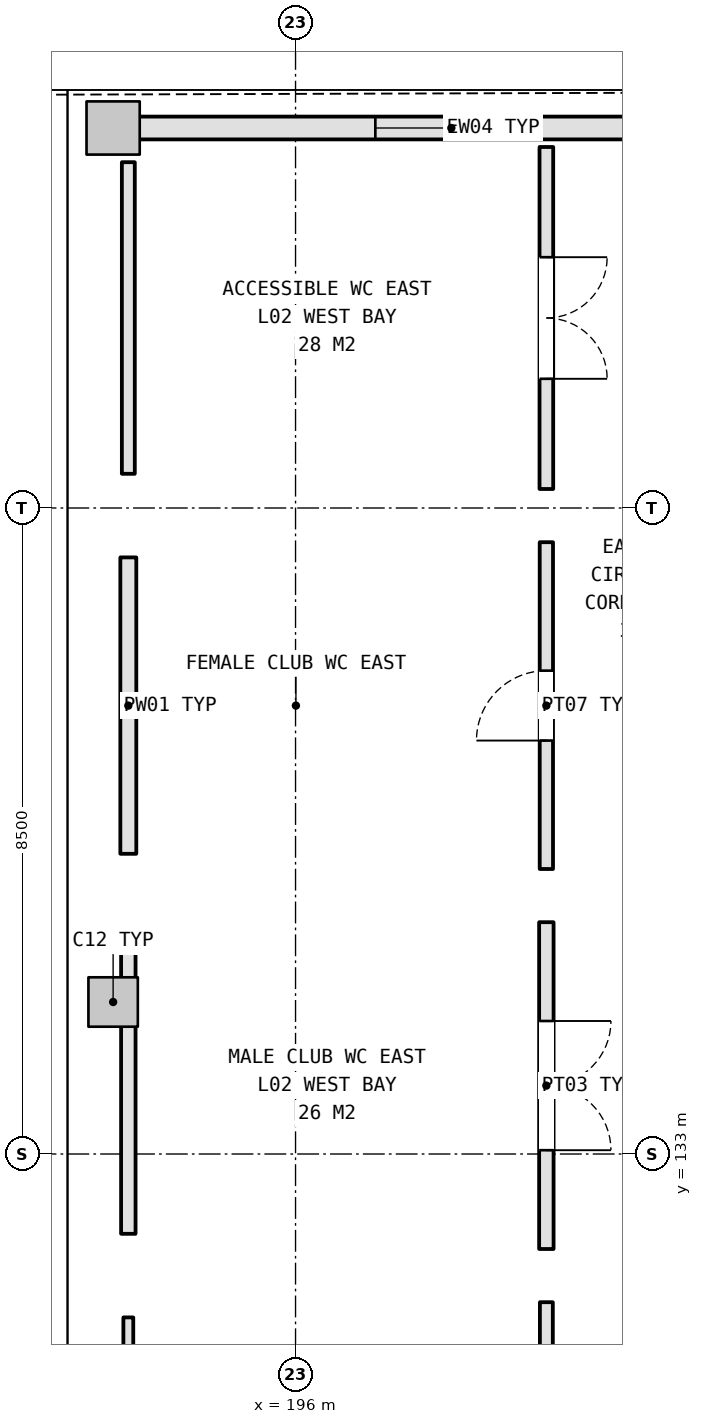
"""IFC4 building model, lengths in metres.
Left out: names, types, materials, properties, quantities, classifications, styles, units other than length and angle.
Written with IfcOpenShell. Run it as: python <this file> out.ifc"""

import sys

from ifc_helpers import new_model, si_unit, direction, frame, frame_2d, origin, origin_2d, place, context, subcontext, project, spatial, rectangle, extrude, element, fill, save


model = new_model("IFC4")
c1 = context("Model", 3, precision=1e-05, world=origin(), true_north=direction((0.0, 1.0)))
c2 = subcontext(c1, "Body", "Model", "MODEL_VIEW")
j1 = project(units=[si_unit("LENGTHUNIT", "METRE"), si_unit("PLANEANGLEUNIT", "RADIAN")], contexts=[c1])
p1 = place(None, origin())
s1 = spatial("IfcSite", under=j1, at=p1, CompositionType="ELEMENT")
p2 = place(p1, origin())
s2 = spatial("IfcBuilding", under=s1, at=p2, CompositionType="ELEMENT")
p3 = place(p2, frame((0.0, 0.0, 10.8)))
s3 = spatial("IfcBuildingStorey", under=s2, at=p3, CompositionType="ELEMENT", Elevation=10.8)
p4 = place(p3, frame((193.6, 135.0, 0.0), z_axis=(0.0, 0.0, 1.0), x_axis=(1.0, 0.0, 0.0)))
e1 = element("IfcColumn", 1, at=p4, inside=s3, PredefinedType="COLUMN", context=c2, shape_type="SweptSolid", body=[
    extrude(rectangle(XDim=0.65, YDim=0.65, at=origin_2d()), origin(), (0.0, 0.0, 1.0), 5.4),
])
p5 = place(p3, frame((193.6, 146.5, 0.0), z_axis=(0.0, 0.0, 1.0), x_axis=(1.0, 0.0, 0.0)))
e2 = element("IfcColumn", 2, at=p5, inside=s3, PredefinedType="COLUMN", context=c2, shape_type="SweptSolid", body=[
    extrude(rectangle(XDim=0.7, YDim=0.7, at=origin_2d()), origin(), (0.0, 0.0, 1.0), 5.4),
])
p6 = place(p3, frame((193.938, 146.5, 0.0), z_axis=(0.0, 0.0, 1.0), x_axis=(1.0, 0.0, 0.0)))
e3 = element("IfcWall", 3, at=p6, inside=s3, PredefinedType="SOLIDWALL", context=c2, shape_type="SweptSolid", body=[
    extrude(rectangle(XDim=8.224, YDim=0.3, at=frame_2d((4.112, 0.0))), origin(), (0.0, 0.0, 1.0), 4.455),
])
p7 = place(p6, frame((3.112, 0.0, 1.05)))
e4 = element("IfcOpeningElement", 4, at=p7, cuts=e3, PredefinedType="OPENING", context=c2, shape_type="SweptSolid", body=[
    extrude(rectangle(XDim=2.0, YDim=1.7, at=frame_2d((1.0, 0.85))), frame((0.0, 0.16, 0.0), z_axis=(0.0, -1.0, 0.0), x_axis=(1.0, 0.0, 0.0)), (0.0, 0.0, 1.0), 0.32),
])
p8 = place(p3, frame((199.3, 131.05, 0.0), z_axis=(0.0, 0.0, 1.0), x_axis=(0.0, -1.0, 0.0)))
e5 = element("IfcWall", 5, at=p8, inside=s3, PredefinedType="PARTITIONING", context=c2, shape_type="SweptSolid", body=[
    extrude(rectangle(XDim=13.3, YDim=0.17, at=frame_2d((6.65, 0.0))), origin(), (0.0, 0.0, 1.0), 4.605),
])
p9 = place(p8, frame((6.175, 0.0, 0.0)))
e6 = element("IfcOpeningElement", 6, at=p9, cuts=e5, PredefinedType="OPENING", context=c2, shape_type="SweptSolid", body=[
    extrude(rectangle(XDim=0.95, YDim=2.15, at=frame_2d((0.475, 1.075))), frame((0.0, 0.095, 0.0), z_axis=(0.0, -1.0, 0.0), x_axis=(1.0, 0.0, 0.0)), (0.0, 0.0, 1.0), 0.19),
])
p10 = place(p3, frame((193.8, 117.95, 0.0), z_axis=(0.0, 0.0, 1.0), x_axis=(0.0, 1.0, 0.0)))
e7 = element("IfcWall", 7, at=p10, inside=s3, PredefinedType="PARTITIONING", context=c2, shape_type="SweptSolid", body=[
    extrude(rectangle(XDim=12.9, YDim=0.13, at=frame_2d((6.45, 0.0))), origin(), (0.0, 0.0, 1.0), 4.455),
])
p11 = place(p3, frame((199.3, 136.05, 0.0), z_axis=(0.0, 0.0, 1.0), x_axis=(0.0, -1.0, 0.0)))
e8 = element("IfcWall", 8, at=p11, inside=s3, PredefinedType="PARTITIONING", context=c2, shape_type="SweptSolid", body=[
    extrude(rectangle(XDim=4.3, YDim=0.19, at=frame_2d((2.15, 0.0))), origin(), (0.0, 0.0, 1.0), 4.695),
])
p12 = place(p11, frame((1.3, 0.0, 0.0)))
e9 = element("IfcOpeningElement", 9, at=p12, cuts=e8, PredefinedType="OPENING", context=c2, shape_type="SweptSolid", body=[
    extrude(rectangle(XDim=1.7, YDim=2.25, at=frame_2d((0.85, 1.125))), frame((0.0, 0.105, 0.0), z_axis=(0.0, -1.0, 0.0), x_axis=(1.0, 0.0, 0.0)), (0.0, 0.0, 1.0), 0.21),
])
p13 = place(p3, frame((193.8, 131.95, 0.0), z_axis=(0.0, 0.0, 1.0), x_axis=(0.0, 1.0, 0.0)))
e10 = element("IfcWall", 10, at=p13, inside=s3, PredefinedType="PARTITIONING", context=c2, shape_type="SweptSolid", body=[
    extrude(rectangle(XDim=3.9, YDim=0.19, at=frame_2d((1.95, 0.0))), origin(), (0.0, 0.0, 1.0), 4.455),
])
p14 = place(p3, frame((199.3, 141.05, 0.0), z_axis=(0.0, 0.0, 1.0), x_axis=(0.0, -1.0, 0.0)))
e11 = element("IfcWall", 11, at=p14, inside=s3, PredefinedType="PARTITIONING", context=c2, shape_type="SweptSolid", body=[
    extrude(rectangle(XDim=4.3, YDim=0.175, at=frame_2d((2.15, 0.0))), origin(), (0.0, 0.0, 1.0), 4.605),
])
p15 = place(p14, frame((1.69, 0.0, 0.0)))
e12 = element("IfcOpeningElement", 12, at=p15, cuts=e11, PredefinedType="OPENING", context=c2, shape_type="SweptSolid", body=[
    extrude(rectangle(XDim=0.92, YDim=2.1, at=frame_2d((0.46, 1.05))), frame((0.0, 0.097, 0.0), z_axis=(0.0, -1.0, 0.0), x_axis=(1.0, 0.0, 0.0)), (0.0, 0.0, 1.0), 0.195),
])
p16 = place(p3, frame((193.8, 136.95, 0.0), z_axis=(0.0, 0.0, 1.0), x_axis=(0.0, 1.0, 0.0)))
e13 = element("IfcWall", 13, at=p16, inside=s3, PredefinedType="PLUMBINGWALL", context=c2, shape_type="SweptSolid", body=[
    extrude(rectangle(XDim=3.9, YDim=0.21, at=frame_2d((1.95, 0.0))), origin(), (0.0, 0.0, 1.0), 4.455),
])
p17 = place(p3, frame((199.3, 146.25, 0.0), z_axis=(0.0, 0.0, 1.0), x_axis=(0.0, -1.0, 0.0)))
e14 = element("IfcWall", 14, at=p17, inside=s3, PredefinedType="PARTITIONING", context=c2, shape_type="SweptSolid", body=[
    extrude(rectangle(XDim=4.5, YDim=0.18, at=frame_2d((2.25, 0.0))), origin(), (0.0, 0.0, 1.0), 5.12),
])
p18 = place(p17, frame((1.45, 0.0, 0.0)))
e15 = element("IfcOpeningElement", 15, at=p18, cuts=e14, PredefinedType="OPENING", context=c2, shape_type="SweptSolid", body=[
    extrude(rectangle(XDim=1.6, YDim=2.2, at=frame_2d((0.8, 1.1))), frame((0.0, 0.1, 0.0), z_axis=(0.0, -1.0, 0.0), x_axis=(1.0, 0.0, 0.0)), (0.0, 0.0, 1.0), 0.2),
])
p19 = place(p3, frame((193.8, 141.95, 0.0), z_axis=(0.0, 0.0, 1.0), x_axis=(0.0, 1.0, 0.0)))
e16 = element("IfcWall", 16, at=p19, inside=s3, PredefinedType="PARTITIONING", context=c2, shape_type="SweptSolid", body=[
    extrude(rectangle(XDim=4.1, YDim=0.17, at=frame_2d((2.05, 0.0))), origin(), (0.0, 0.0, 1.0), 4.455),
])
p20 = place(p7, origin())
e17 = element("IfcWindow", 17, at=p20, inside=s3, PartitioningType="SINGLE_PANEL", PredefinedType="WINDOW", context=c2, shape_type="SweptSolid", body=[
    extrude(rectangle(XDim=2.0, YDim=1.7, at=frame_2d((1.0, 0.85))), frame((0.0, 0.03, 0.0), z_axis=(0.0, -1.0, 0.0), x_axis=(1.0, 0.0, 0.0)), (0.0, 0.0, 1.0), 0.06),
])
fill(e4, e17)
p21 = place(p12, origin())
e18 = element("IfcDoor", 18, at=p21, inside=s3, OperationType="DOUBLE_DOOR_SINGLE_SWING", PredefinedType="DOOR", context=c2, shape_type="SweptSolid", body=[
    extrude(rectangle(XDim=1.7, YDim=2.25, at=frame_2d((0.85, 1.125))), frame((0.0, 0.025, 0.0), z_axis=(0.0, -1.0, 0.0), x_axis=(1.0, 0.0, 0.0)), (0.0, 0.0, 1.0), 0.05),
])
fill(e9, e18)
p22 = place(p15, frame((0.92, 0.0, 0.0), z_axis=(0.0, 0.0, 1.0), x_axis=(-1.0, 0.0, 0.0)))
e19 = element("IfcDoor", 19, at=p22, inside=s3, OperationType="SINGLE_SWING_RIGHT", PredefinedType="DOOR", context=c2, shape_type="SweptSolid", body=[
    extrude(rectangle(XDim=0.92, YDim=2.1, at=frame_2d((0.46, 1.05))), frame((0.0, 0.025, 0.0), z_axis=(0.0, -1.0, 0.0), x_axis=(1.0, 0.0, 0.0)), (0.0, 0.0, 1.0), 0.05),
])
fill(e12, e19)
p23 = place(p18, origin())
e20 = element("IfcDoor", 20, at=p23, inside=s3, OperationType="DOUBLE_DOOR_SINGLE_SWING", PredefinedType="DOOR", context=c2, shape_type="SweptSolid", body=[
    extrude(rectangle(XDim=1.6, YDim=2.2, at=frame_2d((0.8, 1.1))), frame((0.0, 0.025, 0.0), z_axis=(0.0, -1.0, 0.0), x_axis=(1.0, 0.0, 0.0)), (0.0, 0.0, 1.0), 0.05),
])
fill(e15, e20)
save(model, sys.argv[1])
